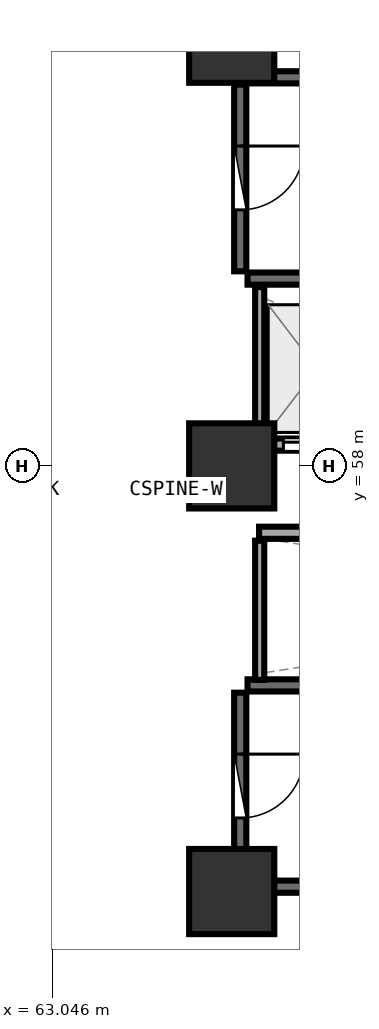
"""IFC4 building model, lengths in metres.
Left out: names, types, materials, properties, quantities, classifications, styles, units other than length and angle.
Written with IfcOpenShell. Run it as: python <this file> out.ifc"""

import sys

from ifc_helpers import new_model, si_unit, direction, frame, frame_2d, origin, origin_2d, place, context, subcontext, project, spatial, rectangle, extrude, element, fill, save


model = new_model("IFC4")
c1 = context("Model", 3, precision=1e-05, world=origin(), true_north=direction((0.0, 1.0)))
c2 = subcontext(c1, "Body", "Model", "MODEL_VIEW")
j1 = project(units=[si_unit("LENGTHUNIT", "METRE"), si_unit("PLANEANGLEUNIT", "RADIAN")], contexts=[c1])
p1 = place(None, origin())
s1 = spatial("IfcSite", under=j1, at=p1, CompositionType="ELEMENT")
p2 = place(p1, origin())
s2 = spatial("IfcBuilding", under=s1, at=p2, CompositionType="ELEMENT")
p3 = place(p2, frame((0.0, 0.0, 37.5)))
s3 = spatial("IfcBuildingStorey", under=s2, at=p3, CompositionType="ELEMENT", Elevation=37.5)
for number, where, z_axis, x_axis in (
    (1, (66.0, 51.0, 0.0), (0.0, 0.0, 1.0), (1.0, 0.0, 0.0)),
    (2, (66.0, 65.0, 0.0), (0.0, 0.0, 1.0), (1.0, 0.0, 0.0)),
    (3, (66.0, 58.0, 0.0), (0.0, 0.0, 1.0), (1.0, 0.0, 0.0)),
):
    element("IfcColumn", number, at=place(p3, frame(where, z_axis=z_axis, x_axis=x_axis)), inside=s3, PredefinedType="PILASTER", context=c2, shape_type="SweptSolid", body=[
        extrude(rectangle(XDim=1.4, YDim=1.4, at=origin_2d()), origin(), (0.0, 0.0, 1.0), 3.75),
    ])
for number, where, z_axis, x_axis in (
    (4, (66.26, 61.08, 0.0), (0.0, 0.0, 1.0), (1.0, 0.0, 0.0)),
    (5, (73.42, 64.39, 0.0), (0.0, 0.0, 1.0), (-1.0, 0.0, 0.0)),
):
    element("IfcWall", number, at=place(p3, frame(where, z_axis=z_axis, x_axis=x_axis)), inside=s3, PredefinedType="SHEAR", context=c2, shape_type="SweptSolid", body=[
        extrude(rectangle(XDim=7.16, YDim=0.2, at=frame_2d((3.58, 0.0))), origin(), (0.0, 0.0, 1.0), 3.49),
    ])
p4 = place(p3, frame((66.14, 64.27, 0.0), z_axis=(0.0, 0.0, 1.0), x_axis=(0.0, -1.0, 0.0)))
e6 = element("IfcWall", 6, at=p4, inside=s3, PredefinedType="SHEAR", context=c2, shape_type="SweptSolid", body=[
    extrude(rectangle(XDim=3.07, YDim=0.2, at=frame_2d((1.535, 0.0))), origin(), (0.0, 0.0, 1.0), 3.49),
])
p5 = place(p4, frame((1.01, 0.0, 0.0)))
e7 = element("IfcOpeningElement", 7, at=p5, cuts=e6, PredefinedType="OPENING", context=c2, shape_type="SweptSolid", body=[
    extrude(rectangle(XDim=1.05, YDim=2.1, at=frame_2d((0.525, 1.05))), frame((0.0, 0.11, 0.0), z_axis=(0.0, -1.0, 0.0), x_axis=(1.0, 0.0, 0.0)), (0.0, 0.0, 1.0), 0.22),
])
for number, where, z_axis, x_axis in (
    (8, (66.26, 51.08, 0.0), (0.0, 0.0, 1.0), (1.0, 0.0, 0.0)),
    (9, (73.42, 54.39, 0.0), (0.0, 0.0, 1.0), (-1.0, 0.0, 0.0)),
):
    element("IfcWall", number, at=place(p3, frame(where, z_axis=z_axis, x_axis=x_axis)), inside=s3, PredefinedType="SHEAR", context=c2, shape_type="SweptSolid", body=[
        extrude(rectangle(XDim=7.16, YDim=0.2, at=frame_2d((3.58, 0.0))), origin(), (0.0, 0.0, 1.0), 3.49),
    ])
p6 = place(p3, frame((66.14, 54.27, 0.0), z_axis=(0.0, 0.0, 1.0), x_axis=(0.0, -1.0, 0.0)))
e10 = element("IfcWall", 10, at=p6, inside=s3, PredefinedType="SHEAR", context=c2, shape_type="SweptSolid", body=[
    extrude(rectangle(XDim=3.07, YDim=0.2, at=frame_2d((1.535, 0.0))), origin(), (0.0, 0.0, 1.0), 3.49),
])
p7 = place(p6, frame((1.01, 0.0, 0.0)))
e11 = element("IfcOpeningElement", 11, at=p7, cuts=e10, PredefinedType="OPENING", context=c2, shape_type="SweptSolid", body=[
    extrude(rectangle(XDim=1.05, YDim=2.1, at=frame_2d((0.525, 1.05))), frame((0.0, 0.11, 0.0), z_axis=(0.0, -1.0, 0.0), x_axis=(1.0, 0.0, 0.0)), (0.0, 0.0, 1.0), 0.22),
])
p8 = place(p3, frame((66.45, 58.35, 0.0), z_axis=(0.0, 0.0, 1.0), x_axis=(1.0, 0.0, 0.0)))
e12 = element("IfcWall", 12, at=p8, inside=s3, PredefinedType="SOLIDWALL", context=c2, shape_type="SweptSolid", body=[
    extrude(rectangle(XDim=6.0, YDim=0.2, at=frame_2d((3.0, 0.0))), origin(), (0.0, 0.0, 1.0), 3.48),
])
p9 = place(p8, frame((0.4, 0.0, 0.0)))
e13 = element("IfcOpeningElement", 13, at=p9, cuts=e12, PredefinedType="OPENING", context=c2, shape_type="SweptSolid", body=[
    extrude(rectangle(XDim=1.1, YDim=2.1, at=frame_2d((0.55, 1.05))), frame((0.0, 0.11, 0.0), z_axis=(0.0, -1.0, 0.0), x_axis=(1.0, 0.0, 0.0)), (0.0, 0.0, 1.0), 0.22),
])
p10 = place(p8, frame((2.4, 0.0, 0.0)))
e14 = element("IfcOpeningElement", 14, at=p10, cuts=e12, PredefinedType="OPENING", context=c2, shape_type="SweptSolid", body=[
    extrude(rectangle(XDim=1.1, YDim=2.1, at=frame_2d((0.55, 1.05))), frame((0.0, 0.11, 0.0), z_axis=(0.0, -1.0, 0.0), x_axis=(1.0, 0.0, 0.0)), (0.0, 0.0, 1.0), 0.22),
])
p11 = place(p8, frame((4.4, 0.0, 0.0)))
e15 = element("IfcOpeningElement", 15, at=p11, cuts=e12, PredefinedType="OPENING", context=c2, shape_type="SweptSolid", body=[
    extrude(rectangle(XDim=1.1, YDim=2.1, at=frame_2d((0.55, 1.05))), frame((0.0, 0.11, 0.0), z_axis=(0.0, -1.0, 0.0), x_axis=(1.0, 0.0, 0.0)), (0.0, 0.0, 1.0), 0.22),
])
p12 = place(p3, frame((66.46, 58.48, 0.0), z_axis=(0.0, 0.0, 1.0), x_axis=(0.0, 1.0, 0.0)))
e16 = element("IfcWall", 16, at=p12, inside=s3, PredefinedType="PARTITIONING", context=c2, shape_type="SweptSolid", body=[
    extrude(rectangle(XDim=2.46, YDim=0.15, at=frame_2d((1.23, 0.0))), origin(), (0.0, 0.0, 1.0), 3.48),
])
p13 = place(p3, frame((66.45, 56.9, 0.0), z_axis=(0.0, 0.0, 1.0), x_axis=(1.0, 0.0, 0.0)))
e17 = element("IfcWall", 17, at=p13, inside=s3, PredefinedType="SOLIDWALL", context=c2, shape_type="SweptSolid", body=[
    extrude(rectangle(XDim=14.4, YDim=0.2, at=frame_2d((7.2, 0.0))), origin(), (0.0, 0.0, 1.0), 3.48),
])
p14 = place(p3, frame((66.46, 54.48, 0.0), z_axis=(0.0, 0.0, 1.0), x_axis=(0.0, 1.0, 0.0)))
e18 = element("IfcWall", 18, at=p14, inside=s3, PredefinedType="PARTITIONING", context=c2, shape_type="SweptSolid", body=[
    extrude(rectangle(XDim=2.29, YDim=0.15, at=frame_2d((1.145, 0.0))), origin(), (0.0, 0.0, 1.0), 3.48),
])
p15 = place(p3, frame((61.559, 50.36, 0.0), z_axis=(0.0, 0.0, 1.0), x_axis=(0.66613233843, -0.745833565682, 0.0)))
e19 = element("IfcWall", 19, at=p15, inside=s3, PredefinedType="PARTITIONING", context=c2, shape_type="SweptSolid", body=[
    extrude(rectangle(XDim=2.414, YDim=0.15, at=frame_2d((1.207, 0.0))), origin(), (0.0, 0.0, 1.0), 2.875),
])
p16 = place(p15, frame((0.732, 0.0, 0.0)))
e20 = element("IfcOpeningElement", 20, at=p16, cuts=e19, PredefinedType="OPENING", context=c2, shape_type="SweptSolid", body=[
    extrude(rectangle(XDim=0.95, YDim=2.08, at=frame_2d((0.475, 1.04))), frame((0.0, 0.085, 0.0), z_axis=(0.0, -1.0, 0.0), x_axis=(1.0, 0.0, 0.0)), (0.0, 0.0, 1.0), 0.17),
])
p17 = place(p5, origin())
e21 = element("IfcDoor", 21, at=p17, inside=s3, OperationType="SINGLE_SWING_LEFT", PredefinedType="DOOR", context=c2, shape_type="SweptSolid", body=[
    extrude(rectangle(XDim=1.05, YDim=2.1, at=frame_2d((0.525, 1.05))), frame((0.0, 0.025, 0.0), z_axis=(0.0, -1.0, 0.0), x_axis=(1.0, 0.0, 0.0)), (0.0, 0.0, 1.0), 0.05),
])
fill(e7, e21)
p18 = place(p7, origin())
e22 = element("IfcDoor", 22, at=p18, inside=s3, OperationType="SINGLE_SWING_LEFT", PredefinedType="DOOR", context=c2, shape_type="SweptSolid", body=[
    extrude(rectangle(XDim=1.05, YDim=2.1, at=frame_2d((0.525, 1.05))), frame((0.0, 0.025, 0.0), z_axis=(0.0, -1.0, 0.0), x_axis=(1.0, 0.0, 0.0)), (0.0, 0.0, 1.0), 0.05),
])
fill(e11, e22)
p19 = place(p9, origin())
e23 = element("IfcDoor", 23, at=p19, inside=s3, OperationType="DOUBLE_DOOR_SLIDING", PredefinedType="DOOR", context=c2, shape_type="SweptSolid", body=[
    extrude(rectangle(XDim=1.1, YDim=2.1, at=frame_2d((0.55, 1.05))), frame((0.0, 0.025, 0.0), z_axis=(0.0, -1.0, 0.0), x_axis=(1.0, 0.0, 0.0)), (0.0, 0.0, 1.0), 0.05),
])
fill(e13, e23)
save(model, sys.argv[1])
